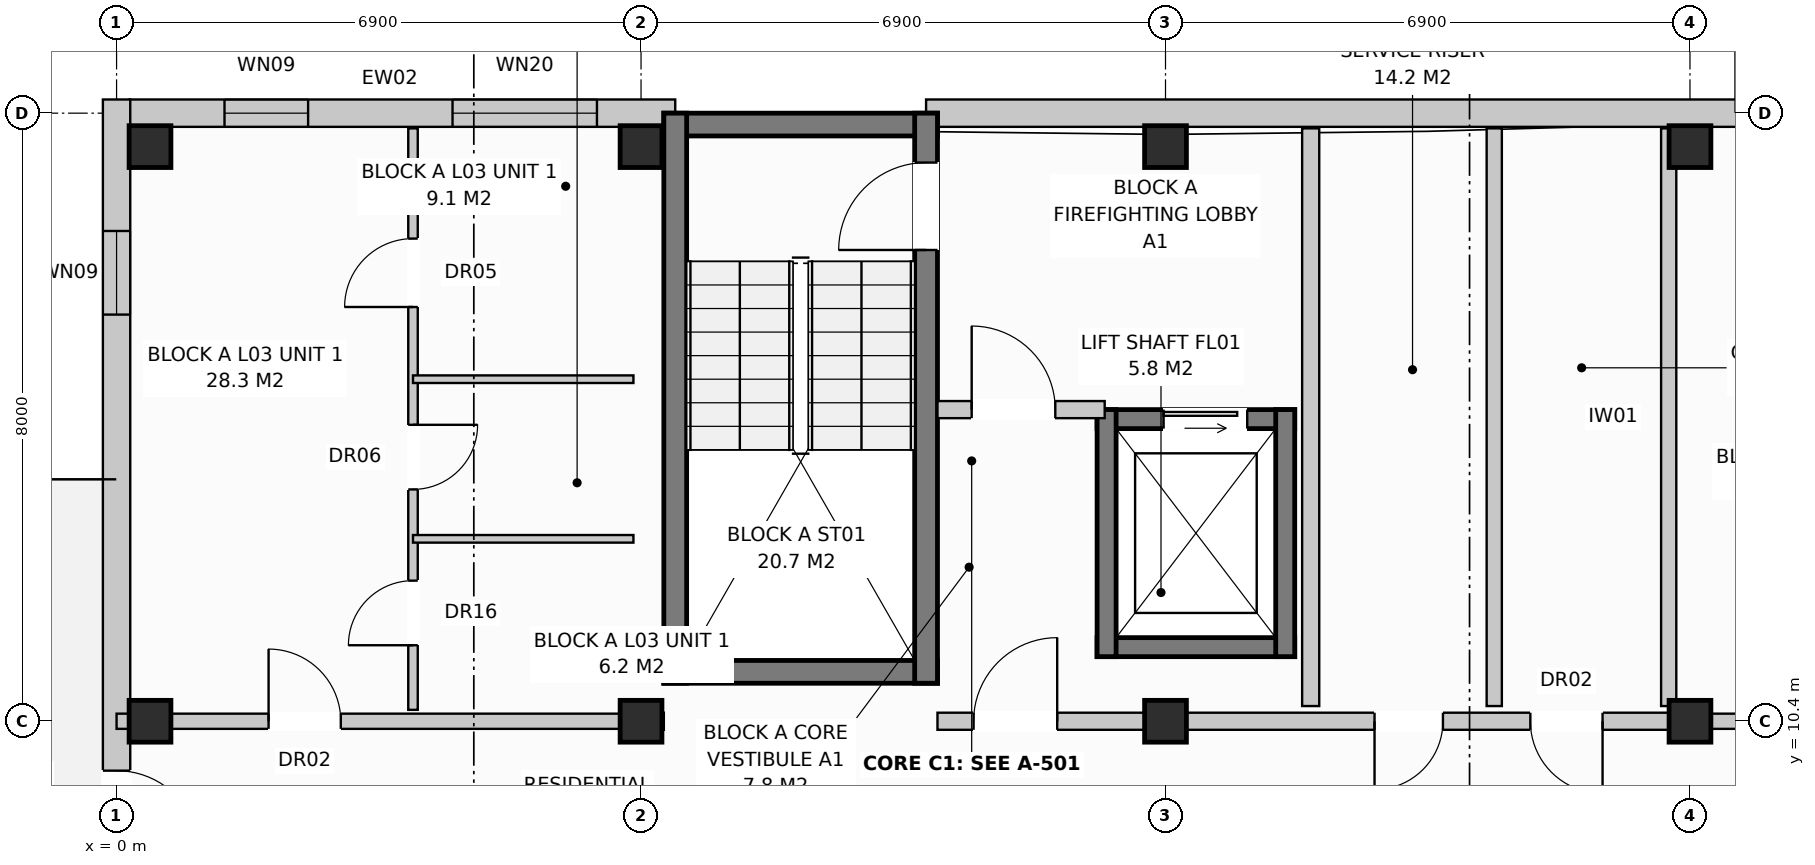
"""IFC4 building model, lengths in metres.
Left out: names, types, materials, properties, quantities, classifications, styles, units other than length and angle.
Written with IfcOpenShell. Run it as: python <this file> out.ifc"""

import sys

from ifc_helpers import new_model, si_unit, direction, frame, frame_2d, origin, origin_with_axes, origin_2d, place, context, subcontext, project, spatial, rectangle, extrude, element, fill, save


model = new_model("IFC4")
c1 = context("Model", 3, precision=1e-05, world=origin(), true_north=direction((0.0, 1.0)))
c2 = subcontext(c1, "Body", "Model", "MODEL_VIEW")
j1 = project(units=[si_unit("LENGTHUNIT", "METRE"), si_unit("PLANEANGLEUNIT", "RADIAN")], contexts=[c1])
p1 = place(None, origin())
s1 = spatial("IfcSite", under=j1, at=p1, CompositionType="ELEMENT")
p2 = place(p1, origin())
s2 = spatial("IfcBuilding", under=s1, at=p2, CompositionType="ELEMENT")
p3 = place(p2, frame((0.0, 0.0, 11.2)))
s3 = spatial("IfcBuildingStorey", under=s2, at=p3, CompositionType="ELEMENT", Elevation=11.2)
for number, where, z_axis, x_axis in (
    (1, (0.44, 10.4, 0.0), (0.0, 0.0, 1.0), (1.0, 0.0, 0.0)),
    (2, (0.44, 17.96, 0.0), (0.0, 0.0, 1.0), (1.0, 0.0, 0.0)),
    (3, (6.9, 10.4, 0.0), (0.0, 0.0, 1.0), (1.0, 0.0, 0.0)),
    (4, (6.9, 17.96, 0.0), (0.0, 0.0, 1.0), (1.0, 0.0, 0.0)),
    (5, (13.8, 10.4, 0.0), (0.0, 0.0, 1.0), (1.0, 0.0, 0.0)),
    (6, (13.8, 17.96, 0.0), (0.0, 0.0, 1.0), (1.0, 0.0, 0.0)),
    (7, (20.7, 10.4, 0.0), (0.0, 0.0, 1.0), (1.0, 0.0, 0.0)),
    (8, (20.7, 17.96, 0.0), (0.0, 0.0, 1.0), (1.0, 0.0, 0.0)),
):
    element("IfcColumn", number, at=place(p3, frame(where, z_axis=z_axis, x_axis=x_axis)), inside=s3, PredefinedType="COLUMN", context=c2, shape_type="SweptSolid", body=[
        extrude(rectangle(XDim=0.55, YDim=0.55, at=origin_2d()), origin(), (0.0, 0.0, 1.0), 3.2),
    ])
p4 = place(p3, frame((0.17, 18.4, 0.0), z_axis=(0.0, 0.0, 1.0), x_axis=(1.0, 0.0, 0.0)))
e9 = element("IfcWall", 9, at=p4, inside=s3, PredefinedType="STANDARD", context=c2, shape_type="SweptSolid", body=[
    extrude(rectangle(XDim=7.18, YDim=0.36, at=frame_2d((3.59, 0.0))), origin(), (0.0, 0.0, 1.0), 2.94),
])
p5 = place(p4, frame((1.25, 0.0, 0.72)))
e10 = element("IfcOpeningElement", 10, at=p5, cuts=e9, PredefinedType="OPENING", context=c2, shape_type="SweptSolid", body=[
    extrude(rectangle(XDim=1.1, YDim=1.5, at=frame_2d((0.55, 0.75))), frame((0.0, 0.192, 0.0), z_axis=(0.0, -1.0, 0.0), x_axis=(1.0, 0.0, 0.0)), (0.0, 0.0, 1.0), 0.384),
])
p6 = place(p4, frame((4.25, 0.0, 0.8)))
e11 = element("IfcOpeningElement", 11, at=p6, cuts=e9, PredefinedType="OPENING", context=c2, shape_type="SweptSolid", body=[
    extrude(rectangle(XDim=1.9, YDim=1.85, at=frame_2d((0.95, 0.925))), frame((0.0, 0.192, 0.0), z_axis=(0.0, -1.0, 0.0), x_axis=(1.0, 0.0, 0.0)), (0.0, 0.0, 1.0), 0.384),
])
p7 = place(p3, frame((10.65, 18.4, 0.0), z_axis=(0.0, 0.0, 1.0), x_axis=(1.0, 0.0, 0.0)))
e12 = element("IfcWall", 12, at=p7, inside=s3, PredefinedType="STANDARD", context=c2, shape_type="SweptSolid", body=[
    extrude(rectangle(XDim=17.4, YDim=0.36, at=frame_2d((8.7, 0.0))), origin(), (0.0, 0.0, 1.0), 2.94),
])
p8 = place(p7, frame((11.87, 0.0, 0.0)))
e13 = element("IfcOpeningElement", 13, at=p8, cuts=e12, PredefinedType="OPENING", context=c2, shape_type="SweptSolid", body=[
    extrude(rectangle(XDim=0.95, YDim=2.1, at=frame_2d((0.475, 1.05))), frame((0.0, 0.192, 0.0), z_axis=(0.0, -1.0, 0.0), x_axis=(1.0, 0.0, 0.0)), (0.0, 0.0, 1.0), 0.384),
])
p9 = place(p7, frame((14.97, 0.0, 0.72)))
e14 = element("IfcOpeningElement", 14, at=p9, cuts=e12, PredefinedType="OPENING", context=c2, shape_type="SweptSolid", body=[
    extrude(rectangle(XDim=1.1, YDim=1.5, at=frame_2d((0.55, 0.75))), frame((0.0, 0.192, 0.0), z_axis=(0.0, -1.0, 0.0), x_axis=(1.0, 0.0, 0.0)), (0.0, 0.0, 1.0), 0.384),
])
p10 = place(p3, frame((0.0, -0.18, 0.0), z_axis=(0.0, 0.0, 1.0), x_axis=(0.0, 1.0, 0.0)))
e15 = element("IfcWall", 15, at=p10, inside=s3, PredefinedType="STANDARD", context=c2, shape_type="SweptSolid", body=[
    extrude(rectangle(XDim=18.76, YDim=0.36, at=frame_2d((9.38, 0.0))), origin(), (0.0, 0.0, 1.0), 2.94),
])
p11 = place(p10, frame((8.83, 0.0, 0.0)))
e16 = element("IfcOpeningElement", 16, at=p11, cuts=e15, PredefinedType="OPENING", context=c2, shape_type="SweptSolid", body=[
    extrude(rectangle(XDim=1.1, YDim=2.1, at=frame_2d((0.55, 1.05))), frame((0.0, 0.192, 0.0), z_axis=(0.0, -1.0, 0.0), x_axis=(1.0, 0.0, 0.0)), (0.0, 0.0, 1.0), 0.384),
])
p12 = place(p10, frame((1.73, 0.0, 0.72)))
e17 = element("IfcOpeningElement", 17, at=p12, cuts=e15, PredefinedType="OPENING", context=c2, shape_type="SweptSolid", body=[
    extrude(rectangle(XDim=1.1, YDim=1.5, at=frame_2d((0.55, 0.75))), frame((0.0, 0.192, 0.0), z_axis=(0.0, -1.0, 0.0), x_axis=(1.0, 0.0, 0.0)), (0.0, 0.0, 1.0), 0.384),
])
p13 = place(p10, frame((15.93, 0.0, 0.72)))
e18 = element("IfcOpeningElement", 18, at=p13, cuts=e15, PredefinedType="OPENING", context=c2, shape_type="SweptSolid", body=[
    extrude(rectangle(XDim=1.1, YDim=1.5, at=frame_2d((0.55, 0.75))), frame((0.0, 0.192, 0.0), z_axis=(0.0, -1.0, 0.0), x_axis=(1.0, 0.0, 0.0)), (0.0, 0.0, 1.0), 0.384),
])
for number, where, z_axis, x_axis in (
    (19, (7.2, 18.25, 0.0), (0.0, 0.0, 1.0), (1.0, 0.0, 0.0)),
    (20, (7.2, 11.05, 0.0), (0.0, 0.0, 1.0), (1.0, 0.0, 0.0)),
):
    element("IfcWall", number, at=place(p3, frame(where, z_axis=z_axis, x_axis=x_axis)), inside=s3, PredefinedType="SHEAR", context=c2, shape_type="SweptSolid", body=[
        extrude(rectangle(XDim=3.6, YDim=0.3, at=frame_2d((1.8, 0.0))), origin(), (0.0, 0.0, 1.0), 2.94),
    ])
p14 = place(p3, frame((7.35, 10.9, 0.0), z_axis=(0.0, 0.0, 1.0), x_axis=(0.0, 1.0, 0.0)))
e21 = element("IfcWall", 21, at=p14, inside=s3, PredefinedType="SHEAR", context=c2, shape_type="SweptSolid", body=[
    extrude(rectangle(XDim=7.5, YDim=0.3, at=frame_2d((3.75, 0.0))), origin(), (0.0, 0.0, 1.0), 2.94),
])
p15 = place(p3, frame((10.65, 10.9, 0.0), z_axis=(0.0, 0.0, 1.0), x_axis=(0.0, 1.0, 0.0)))
e22 = element("IfcWall", 22, at=p15, inside=s3, PredefinedType="SHEAR", context=c2, shape_type="SweptSolid", body=[
    extrude(rectangle(XDim=7.5, YDim=0.3, at=frame_2d((3.75, 0.0))), origin(), (0.0, 0.0, 1.0), 2.94),
])
p16 = place(p15, frame((5.7, 0.0, 0.0)))
e23 = element("IfcOpeningElement", 23, at=p16, cuts=e22, PredefinedType="OPENING", context=c2, shape_type="SweptSolid", body=[
    extrude(rectangle(XDim=1.15, YDim=2.15, at=frame_2d((0.575, 1.075))), frame((0.0, 0.162, 0.0), z_axis=(0.0, -1.0, 0.0), x_axis=(1.0, 0.0, 0.0)), (0.0, 0.0, 1.0), 0.324),
])
p17 = place(p3, frame((12.9, 14.375, 0.0), z_axis=(0.0, 0.0, 1.0), x_axis=(1.0, 0.0, 0.0)))
e24 = element("IfcWall", 24, at=p17, inside=s3, PredefinedType="SHEAR", context=c2, shape_type="SweptSolid", body=[
    extrude(rectangle(XDim=2.6, YDim=0.25, at=frame_2d((1.3, 0.0))), origin(), (0.0, 0.0, 1.0), 2.94),
])
p18 = place(p17, frame((0.875, 0.0, 0.0)))
e25 = element("IfcOpeningElement", 25, at=p18, cuts=e24, PredefinedType="OPENING", context=c2, shape_type="SweptSolid", body=[
    extrude(rectangle(XDim=1.1, YDim=2.1, at=frame_2d((0.55, 1.05))), frame((0.0, 0.137, 0.0), z_axis=(0.0, -1.0, 0.0), x_axis=(1.0, 0.0, 0.0)), (0.0, 0.0, 1.0), 0.274),
])
p19 = place(p3, frame((12.9, 11.375, 0.0), z_axis=(0.0, 0.0, 1.0), x_axis=(1.0, 0.0, 0.0)))
e26 = element("IfcWall", 26, at=p19, inside=s3, PredefinedType="SHEAR", context=c2, shape_type="SweptSolid", body=[
    extrude(rectangle(XDim=2.6, YDim=0.25, at=frame_2d((1.3, 0.0))), origin(), (0.0, 0.0, 1.0), 2.94),
])
for number, where, z_axis, x_axis in (
    (27, (13.025, 11.25, 0.0), (0.0, 0.0, 1.0), (0.0, 1.0, 0.0)),
    (28, (15.375, 11.25, 0.0), (0.0, 0.0, 1.0), (0.0, 1.0, 0.0)),
):
    element("IfcWall", number, at=place(p3, frame(where, z_axis=z_axis, x_axis=x_axis)), inside=s3, PredefinedType="SHEAR", context=c2, shape_type="SweptSolid", body=[
        extrude(rectangle(XDim=3.25, YDim=0.25, at=frame_2d((1.625, 0.0))), origin(), (0.0, 0.0, 1.0), 2.94),
    ])
p20 = place(p3, frame((15.71, 10.6, 0.0), z_axis=(0.0, 0.0, 1.0), x_axis=(0.0, 1.0, 0.0)))
e29 = element("IfcWall", 29, at=p20, inside=s3, PredefinedType="PARTITIONING", context=c2, shape_type="SweptSolid", body=[
    extrude(rectangle(XDim=7.6, YDim=0.225, at=frame_2d((3.8, 0.0))), origin(), (0.0, 0.0, 1.0), 2.59),
])
p21 = place(p3, frame((10.8, 14.5, 0.0), z_axis=(0.0, 0.0, 1.0), x_axis=(1.0, 0.0, 0.0)))
e30 = element("IfcWall", 30, at=p21, inside=s3, PredefinedType="PARTITIONING", context=c2, shape_type="SweptSolid", body=[
    extrude(rectangle(XDim=2.2, YDim=0.225, at=frame_2d((1.1, 0.0))), origin(), (0.0, 0.0, 1.0), 2.94),
])
p22 = place(p21, frame((0.45, 0.0, 0.0)))
e31 = element("IfcOpeningElement", 31, at=p22, cuts=e30, PredefinedType="OPENING", context=c2, shape_type="SweptSolid", body=[
    extrude(rectangle(XDim=1.1, YDim=2.15, at=frame_2d((0.55, 1.075))), frame((0.0, 0.125, 0.0), z_axis=(0.0, -1.0, 0.0), x_axis=(1.0, 0.0, 0.0)), (0.0, 0.0, 1.0), 0.249),
])
p23 = place(p3, frame((6.9, 10.4, 0.0), z_axis=(0.0, 0.0, 1.0), x_axis=(1.0, 0.0, 0.0)))
e32 = element("IfcWall", 32, at=p23, inside=s3, PredefinedType="PARTITIONING", context=c2, shape_type="SweptSolid", body=[
    extrude(rectangle(XDim=0.3, YDim=0.225, at=frame_2d((0.15, 0.0))), origin(), (0.0, 0.0, 1.0), 2.94),
])
for number, where, z_axis, x_axis in (
    (33, (18.125, 10.6, 0.0), (0.0, 0.0, 1.0), (0.0, 1.0, 0.0)),
    (34, (20.42, 10.6, 0.0), (0.0, 0.0, 1.0), (0.0, 1.0, 0.0)),
):
    element("IfcWall", number, at=place(p3, frame(where, z_axis=z_axis, x_axis=x_axis)), inside=s3, PredefinedType="PARTITIONING", context=c2, shape_type="SweptSolid", body=[
        extrude(rectangle(XDim=7.6, YDim=0.2, at=frame_2d((3.8, 0.0))), origin(), (0.0, 0.0, 1.0), 2.94),
    ])
p24 = place(p3, frame((10.8, 10.4, 0.0), z_axis=(0.0, 0.0, 1.0), x_axis=(1.0, 0.0, 0.0)))
e35 = element("IfcWall", 35, at=p24, inside=s3, PredefinedType="PARTITIONING", context=c2, shape_type="SweptSolid", body=[
    extrude(rectangle(XDim=9.9, YDim=0.225, at=frame_2d((4.95, 0.0))), origin(), (0.0, 0.0, 1.0), 2.38),
])
p25 = place(p24, frame((0.475, 0.0, 0.0)))
e36 = element("IfcOpeningElement", 36, at=p25, cuts=e35, PredefinedType="OPENING", context=c2, shape_type="SweptSolid", body=[
    extrude(rectangle(XDim=1.1, YDim=2.15, at=frame_2d((0.55, 1.075))), frame((0.0, 0.125, 0.0), z_axis=(0.0, -1.0, 0.0), x_axis=(1.0, 0.0, 0.0)), (0.0, 0.0, 1.0), 0.249),
])
p26 = place(p24, frame((5.75, 0.0, 0.0)))
e37 = element("IfcOpeningElement", 37, at=p26, cuts=e35, PredefinedType="OPENING", context=c2, shape_type="SweptSolid", body=[
    extrude(rectangle(XDim=0.9, YDim=2.1, at=frame_2d((0.45, 1.05))), frame((0.0, 0.125, 0.0), z_axis=(0.0, -1.0, 0.0), x_axis=(1.0, 0.0, 0.0)), (0.0, 0.0, 1.0), 0.249),
])
p27 = place(p24, frame((7.8, 0.0, 0.0)))
e38 = element("IfcOpeningElement", 38, at=p27, cuts=e35, PredefinedType="OPENING", context=c2, shape_type="SweptSolid", body=[
    extrude(rectangle(XDim=0.95, YDim=2.15, at=frame_2d((0.475, 1.075))), frame((0.0, 0.125, 0.0), z_axis=(0.0, -1.0, 0.0), x_axis=(1.0, 0.0, 0.0)), (0.0, 0.0, 1.0), 0.249),
])
p28 = place(p3, frame((0.0, 10.4, 0.0), z_axis=(0.0, 0.0, 1.0), x_axis=(1.0, 0.0, 0.0)))
e39 = element("IfcWall", 39, at=p28, inside=s3, PredefinedType="PARTITIONING", context=c2, shape_type="SweptSolid", body=[
    extrude(rectangle(XDim=6.9, YDim=0.2, at=frame_2d((3.45, 0.0))), origin(), (0.0, 0.0, 1.0), 2.38),
])
p29 = place(p28, frame((2.0, 0.0, 0.0)))
e40 = element("IfcOpeningElement", 40, at=p29, cuts=e39, PredefinedType="OPENING", context=c2, shape_type="SweptSolid", body=[
    extrude(rectangle(XDim=0.95, YDim=2.15, at=frame_2d((0.475, 1.075))), frame((0.0, 0.112, 0.0), z_axis=(0.0, -1.0, 0.0), x_axis=(1.0, 0.0, 0.0)), (0.0, 0.0, 1.0), 0.224),
])
p30 = place(p3, frame((3.9, 10.55, 0.0), z_axis=(0.0, 0.0, 1.0), x_axis=(0.0, 1.0, 0.0)))
e41 = element("IfcWall", 41, at=p30, inside=s3, PredefinedType="PARTITIONING", context=c2, shape_type="SweptSolid", body=[
    extrude(rectangle(XDim=7.65, YDim=0.125, at=frame_2d((3.825, 0.0))), origin(), (0.0, 0.0, 1.0), 2.94),
])
p31 = place(p30, frame((0.85, 0.0, 0.0)))
e42 = element("IfcOpeningElement", 42, at=p31, cuts=e41, PredefinedType="OPENING", context=c2, shape_type="SweptSolid", body=[
    extrude(rectangle(XDim=0.85, YDim=2.1, at=frame_2d((0.425, 1.05))), frame((0.0, 0.074, 0.0), z_axis=(0.0, -1.0, 0.0), x_axis=(1.0, 0.0, 0.0)), (0.0, 0.0, 1.0), 0.149),
])
p32 = place(p30, frame((2.9, 0.0, 0.0)))
e43 = element("IfcOpeningElement", 43, at=p32, cuts=e41, PredefinedType="OPENING", context=c2, shape_type="SweptSolid", body=[
    extrude(rectangle(XDim=0.85, YDim=2.05, at=frame_2d((0.425, 1.025))), frame((0.0, 0.074, 0.0), z_axis=(0.0, -1.0, 0.0), x_axis=(1.0, 0.0, 0.0)), (0.0, 0.0, 1.0), 0.149),
])
p33 = place(p30, frame((5.3, 0.0, 0.0)))
e44 = element("IfcOpeningElement", 44, at=p33, cuts=e41, PredefinedType="OPENING", context=c2, shape_type="SweptSolid", body=[
    extrude(rectangle(XDim=0.9, YDim=2.1, at=frame_2d((0.45, 1.05))), frame((0.0, 0.074, 0.0), z_axis=(0.0, -1.0, 0.0), x_axis=(1.0, 0.0, 0.0)), (0.0, 0.0, 1.0), 0.149),
])
for number, where, z_axis, x_axis in (
    (45, (3.9, 12.8, 0.0), (0.0, 0.0, 1.0), (1.0, 0.0, 0.0)),
    (46, (3.9, 14.9, 0.0), (0.0, 0.0, 1.0), (1.0, 0.0, 0.0)),
):
    element("IfcWall", number, at=place(p3, frame(where, z_axis=z_axis, x_axis=x_axis)), inside=s3, PredefinedType="PARTITIONING", context=c2, shape_type="SweptSolid", body=[
        extrude(rectangle(XDim=2.9, YDim=0.1, at=frame_2d((1.45, 0.0))), origin(), (0.0, 0.0, 1.0), 2.94),
    ])
p34 = place(p3, frame((20.7, 10.4, 0.0), z_axis=(0.0, 0.0, 1.0), x_axis=(1.0, 0.0, 0.0)))
e47 = element("IfcWall", 47, at=p34, inside=s3, PredefinedType="PARTITIONING", context=c2, shape_type="SweptSolid", body=[
    extrude(rectangle(XDim=6.9, YDim=0.2, at=frame_2d((3.45, 0.0))), origin(), (0.0, 0.0, 1.0), 2.38),
])
p35 = place(p34, frame((2.0, 0.0, 0.0)))
e48 = element("IfcOpeningElement", 48, at=p35, cuts=e47, PredefinedType="OPENING", context=c2, shape_type="SweptSolid", body=[
    extrude(rectangle(XDim=0.95, YDim=2.15, at=frame_2d((0.475, 1.075))), frame((0.0, 0.112, 0.0), z_axis=(0.0, -1.0, 0.0), x_axis=(1.0, 0.0, 0.0)), (0.0, 0.0, 1.0), 0.224),
])
p36 = place(p5, origin_with_axes())
e49 = element("IfcWindow", 49, at=p36, inside=s3, PartitioningType="SINGLE_PANEL", PredefinedType="WINDOW", context=c2, shape_type="SweptSolid", body=[
    extrude(rectangle(XDim=1.1, YDim=1.5, at=frame_2d((0.55, 0.75))), frame((0.0, 0.03, 0.0), z_axis=(0.0, -1.0, 0.0), x_axis=(1.0, 0.0, 0.0)), (0.0, 0.0, 1.0), 0.06),
])
fill(e10, e49)
p37 = place(p6, origin_with_axes())
e50 = element("IfcWindow", 50, at=p37, inside=s3, PartitioningType="SINGLE_PANEL", PredefinedType="WINDOW", context=c2, shape_type="SweptSolid", body=[
    extrude(rectangle(XDim=1.9, YDim=1.85, at=frame_2d((0.95, 0.925))), frame((0.0, 0.03, 0.0), z_axis=(0.0, -1.0, 0.0), x_axis=(1.0, 0.0, 0.0)), (0.0, 0.0, 1.0), 0.06),
])
fill(e11, e50)
p38 = place(p11, frame((1.1, 0.0, 0.0), z_axis=(0.0, 0.0, 1.0), x_axis=(-1.0, 0.0, 0.0)))
e51 = element("IfcDoor", 51, at=p38, inside=s3, OperationType="SINGLE_SWING_LEFT", PredefinedType="DOOR", context=c2, shape_type="SweptSolid", body=[
    extrude(rectangle(XDim=1.1, YDim=2.1, at=frame_2d((0.55, 1.05))), frame((0.0, 0.025, 0.0), z_axis=(0.0, -1.0, 0.0), x_axis=(1.0, 0.0, 0.0)), (0.0, 0.0, 1.0), 0.05),
])
fill(e16, e51)
p39 = place(p13, origin_with_axes())
e52 = element("IfcWindow", 52, at=p39, inside=s3, PartitioningType="SINGLE_PANEL", PredefinedType="WINDOW", context=c2, shape_type="SweptSolid", body=[
    extrude(rectangle(XDim=1.1, YDim=1.5, at=frame_2d((0.55, 0.75))), frame((0.0, 0.03, 0.0), z_axis=(0.0, -1.0, 0.0), x_axis=(1.0, 0.0, 0.0)), (0.0, 0.0, 1.0), 0.06),
])
fill(e18, e52)
p40 = place(p16, origin_with_axes())
e53 = element("IfcDoor", 53, at=p40, inside=s3, OperationType="SINGLE_SWING_LEFT", PredefinedType="DOOR", context=c2, shape_type="SweptSolid", body=[
    extrude(rectangle(XDim=1.15, YDim=2.15, at=frame_2d((0.575, 1.075))), frame((0.0, 0.025, 0.0), z_axis=(0.0, -1.0, 0.0), x_axis=(1.0, 0.0, 0.0)), (0.0, 0.0, 1.0), 0.05),
])
fill(e23, e53)
p41 = place(p18, origin_with_axes())
e54 = element("IfcDoor", 54, at=p41, inside=s3, OperationType="SLIDING_TO_LEFT", PredefinedType="DOOR", context=c2, shape_type="SweptSolid", body=[
    extrude(rectangle(XDim=1.1, YDim=2.1, at=frame_2d((0.55, 1.05))), frame((0.0, 0.025, 0.0), z_axis=(0.0, -1.0, 0.0), x_axis=(1.0, 0.0, 0.0)), (0.0, 0.0, 1.0), 0.05),
])
fill(e25, e54)
p42 = place(p22, origin_with_axes())
e55 = element("IfcDoor", 55, at=p42, inside=s3, OperationType="SINGLE_SWING_LEFT", PredefinedType="DOOR", context=c2, shape_type="SweptSolid", body=[
    extrude(rectangle(XDim=1.1, YDim=2.15, at=frame_2d((0.55, 1.075))), frame((0.0, 0.025, 0.0), z_axis=(0.0, -1.0, 0.0), x_axis=(1.0, 0.0, 0.0)), (0.0, 0.0, 1.0), 0.05),
])
fill(e31, e55)
p43 = place(p25, origin_with_axes())
e56 = element("IfcDoor", 56, at=p43, inside=s3, OperationType="SINGLE_SWING_RIGHT", PredefinedType="DOOR", context=c2, shape_type="SweptSolid", body=[
    extrude(rectangle(XDim=1.1, YDim=2.15, at=frame_2d((0.55, 1.075))), frame((0.0, 0.025, 0.0), z_axis=(0.0, -1.0, 0.0), x_axis=(1.0, 0.0, 0.0)), (0.0, 0.0, 1.0), 0.05),
])
fill(e36, e56)
p44 = place(p26, frame((0.9, 0.0, 0.0), z_axis=(0.0, 0.0, 1.0), x_axis=(-1.0, 0.0, 0.0)))
e57 = element("IfcDoor", 57, at=p44, inside=s3, OperationType="SINGLE_SWING_LEFT", PredefinedType="DOOR", context=c2, shape_type="SweptSolid", body=[
    extrude(rectangle(XDim=0.9, YDim=2.1, at=frame_2d((0.45, 1.05))), frame((0.0, 0.025, 0.0), z_axis=(0.0, -1.0, 0.0), x_axis=(1.0, 0.0, 0.0)), (0.0, 0.0, 1.0), 0.05),
])
fill(e37, e57)
p45 = place(p27, frame((0.95, 0.0, 0.0), z_axis=(0.0, 0.0, 1.0), x_axis=(-1.0, 0.0, 0.0)))
e58 = element("IfcDoor", 58, at=p45, inside=s3, OperationType="SINGLE_SWING_RIGHT", PredefinedType="DOOR", context=c2, shape_type="SweptSolid", body=[
    extrude(rectangle(XDim=0.95, YDim=2.15, at=frame_2d((0.475, 1.075))), frame((0.0, 0.025, 0.0), z_axis=(0.0, -1.0, 0.0), x_axis=(1.0, 0.0, 0.0)), (0.0, 0.0, 1.0), 0.05),
])
fill(e38, e58)
p46 = place(p29, origin_with_axes())
e59 = element("IfcDoor", 59, at=p46, inside=s3, OperationType="SINGLE_SWING_LEFT", PredefinedType="DOOR", context=c2, shape_type="SweptSolid", body=[
    extrude(rectangle(XDim=0.95, YDim=2.15, at=frame_2d((0.475, 1.075))), frame((0.0, 0.025, 0.0), z_axis=(0.0, -1.0, 0.0), x_axis=(1.0, 0.0, 0.0)), (0.0, 0.0, 1.0), 0.05),
])
fill(e40, e59)
p47 = place(p31, origin_with_axes())
e60 = element("IfcDoor", 60, at=p47, inside=s3, OperationType="SINGLE_SWING_LEFT", PredefinedType="DOOR", context=c2, shape_type="SweptSolid", body=[
    extrude(rectangle(XDim=0.85, YDim=2.1, at=frame_2d((0.425, 1.05))), frame((0.0, 0.025, 0.0), z_axis=(0.0, -1.0, 0.0), x_axis=(1.0, 0.0, 0.0)), (0.0, 0.0, 1.0), 0.05),
])
fill(e42, e60)
p48 = place(p32, frame((0.85, 0.0, 0.0), z_axis=(0.0, 0.0, 1.0), x_axis=(-1.0, 0.0, 0.0)))
e61 = element("IfcDoor", 61, at=p48, inside=s3, OperationType="SINGLE_SWING_RIGHT", PredefinedType="DOOR", context=c2, shape_type="SweptSolid", body=[
    extrude(rectangle(XDim=0.85, YDim=2.05, at=frame_2d((0.425, 1.025))), frame((0.0, 0.025, 0.0), z_axis=(0.0, -1.0, 0.0), x_axis=(1.0, 0.0, 0.0)), (0.0, 0.0, 1.0), 0.05),
])
fill(e43, e61)
p49 = place(p33, origin_with_axes())
e62 = element("IfcDoor", 62, at=p49, inside=s3, OperationType="SINGLE_SWING_LEFT", PredefinedType="DOOR", context=c2, shape_type="SweptSolid", body=[
    extrude(rectangle(XDim=0.9, YDim=2.1, at=frame_2d((0.45, 1.05))), frame((0.0, 0.025, 0.0), z_axis=(0.0, -1.0, 0.0), x_axis=(1.0, 0.0, 0.0)), (0.0, 0.0, 1.0), 0.05),
])
fill(e44, e62)
save(model, sys.argv[1])
